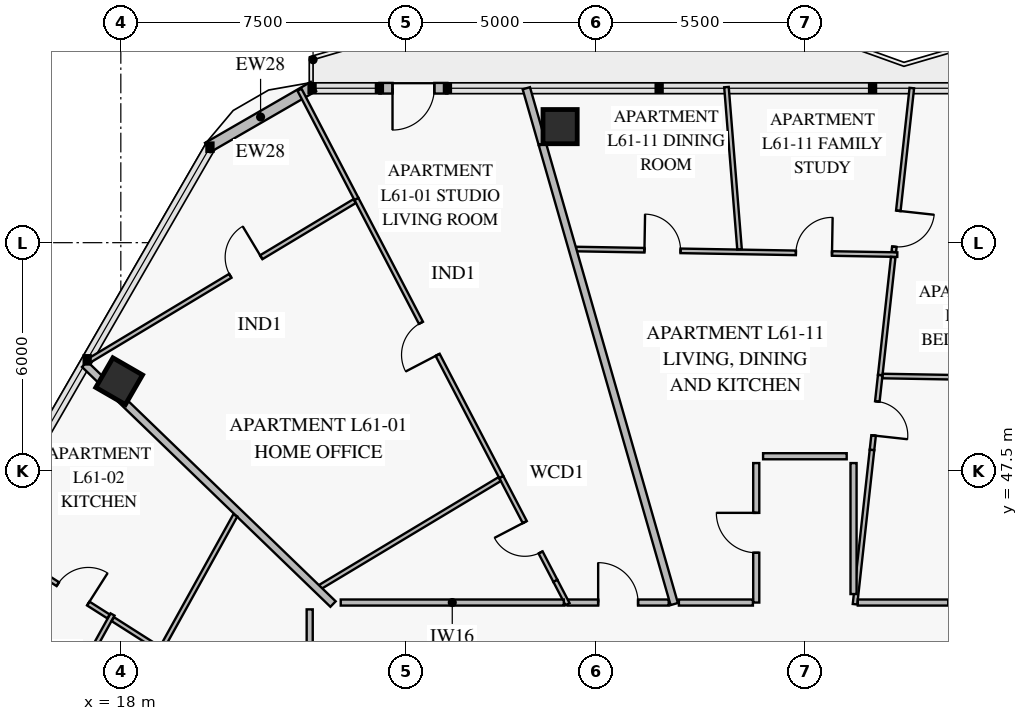
"""IFC4 building model, lengths in metres.
Left out: names, types, materials, properties, quantities, classifications, styles, units other than length and angle.
Written with IfcOpenShell. Run it as: python <this file> out.ifc"""

import sys

from ifc_helpers import new_model, si_unit, direction, frame, frame_2d, origin, origin_2d, place, context, subcontext, project, spatial, rectangle, extrude, element, fill, save


model = new_model("IFC4")
c1 = context("Model", 3, precision=1e-05, world=origin(), true_north=direction((0.0, 1.0)))
c2 = subcontext(c1, "Body", "Model", "MODEL_VIEW")
j1 = project(units=[si_unit("LENGTHUNIT", "METRE"), si_unit("PLANEANGLEUNIT", "RADIAN")], contexts=[c1])
p1 = place(None, origin())
s1 = spatial("IfcSite", under=j1, at=p1, CompositionType="ELEMENT")
p2 = place(p1, origin())
s2 = spatial("IfcBuilding", under=s1, at=p2, CompositionType="ELEMENT")
p3 = place(p2, frame((0.0, 0.0, 242.6)))
s3 = spatial("IfcBuildingStorey", under=s2, at=p3, CompositionType="ELEMENT", Elevation=242.6)
for number, where, z_axis, x_axis in (
    (1, (29.559, 56.554, 0.0), (0.0, 0.0, 1.0), (-1.0, 0.0, 0.0)),
    (2, (17.956, 49.855, 0.0), (0.0, 0.0, 1.0), (-0.5, -0.866, 0.0)),
):
    element("IfcColumn", number, at=place(p3, frame(where, z_axis=z_axis, x_axis=x_axis)), inside=s3, PredefinedType="COLUMN", context=c2, shape_type="SweptSolid", body=[
        extrude(rectangle(XDim=0.9, YDim=0.9, at=origin_2d()), origin(), (0.0, 0.0, 1.0), 3.55),
    ])
p4 = place(p3, frame((20.285, 56.004, 0.0), z_axis=(0.0, 0.0, 1.0), x_axis=(0.866028773314, 0.499994163758, 0.0)))
e3 = element("IfcWall", 3, at=p4, inside=s3, PredefinedType="SOLIDWALL", context=c2, shape_type="SweptSolid", body=[
    extrude(rectangle(XDim=3.215, YDim=0.28, at=frame_2d((1.607, 0.0))), origin(), (0.0, 0.0, 1.0), 3.55),
])
p5 = place(p3, frame((24.804, 57.564, 0.0), z_axis=(0.0, 0.0, 1.0), x_axis=(1.0, 0.0, 0.0)))
e4 = element("IfcWall", 4, at=p5, inside=s3, PredefinedType="SOLIDWALL", context=c2, shape_type="SweptSolid", body=[
    extrude(rectangle(XDim=1.79, YDim=0.28, at=frame_2d((0.895, 0.0))), origin(), (0.0, 0.0, 1.0), 3.55),
])
p6 = place(p5, frame((0.345, 0.0, 0.0)))
e5 = element("IfcOpeningElement", 5, at=p6, cuts=e4, PredefinedType="OPENING", context=c2, shape_type="SweptSolid", body=[
    extrude(rectangle(XDim=1.1, YDim=2.2, at=frame_2d((0.55, 1.1))), frame((0.0, 0.152, 0.0), z_axis=(0.0, -1.0, 0.0), x_axis=(1.0, 0.0, 0.0)), (0.0, 0.0, 1.0), 0.304),
])
p7 = place(p3, frame((29.435, 44.6, 0.0), z_axis=(0.0, 0.0, 1.0), x_axis=(-0.462075917285, 0.886840372708, 0.0)))
e6 = element("IfcWall", 6, at=p7, inside=s3, PredefinedType="PARTITIONING", context=c2, shape_type="SweptSolid", body=[
    extrude(rectangle(XDim=3.082, YDim=0.12, at=frame_2d((1.541, 0.0))), origin(), (0.0, 0.0, 1.0), 3.55),
])
p8 = place(p7, frame((0.844, 0.0, 0.0)))
e7 = element("IfcOpeningElement", 7, at=p8, cuts=e6, PredefinedType="OPENING", context=c2, shape_type="SweptSolid", body=[
    extrude(rectangle(XDim=0.9, YDim=2.1, at=frame_2d((0.45, 1.05))), frame((0.0, 0.072, 0.0), z_axis=(0.0, -1.0, 0.0), x_axis=(1.0, 0.0, 0.0)), (0.0, 0.0, 1.0), 0.144),
])
p9 = place(p3, frame((28.011, 47.333, 0.0), z_axis=(0.0, 0.0, 1.0), x_axis=(-0.46205322058, 0.886852198143, 0.0)))
e8 = element("IfcWall", 8, at=p9, inside=s3, PredefinedType="PARTITIONING", context=c2, shape_type="SweptSolid", body=[
    extrude(rectangle(XDim=8.251, YDim=0.12, at=frame_2d((4.125, 0.0))), origin(), (0.0, 0.0, 1.0), 2.93),
])
p10 = place(p9, frame((3.625, 0.0, 0.0)))
e9 = element("IfcOpeningElement", 9, at=p10, cuts=e8, PredefinedType="OPENING", context=c2, shape_type="SweptSolid", body=[
    extrude(rectangle(XDim=0.95, YDim=2.1, at=frame_2d((0.475, 1.05))), frame((0.0, 0.072, 0.0), z_axis=(0.0, -1.0, 0.0), x_axis=(1.0, 0.0, 0.0)), (0.0, 0.0, 1.0), 0.144),
])
p11 = place(p3, frame((24.152, 54.593, 0.0), z_axis=(0.0, 0.0, 1.0), x_axis=(-0.857165830908, -0.51504052105, 0.0)))
e10 = element("IfcWall", 10, at=p11, inside=s3, PredefinedType="PARTITIONING", context=c2, shape_type="SweptSolid", body=[
    extrude(rectangle(XDim=8.171, YDim=0.12, at=frame_2d((4.085, 0.0))), origin(), (0.0, 0.0, 1.0), 3.122),
])
p12 = place(p11, frame((2.866, 0.0, 0.0)))
e11 = element("IfcOpeningElement", 11, at=p12, cuts=e10, PredefinedType="OPENING", context=c2, shape_type="SweptSolid", body=[
    extrude(rectangle(XDim=0.95, YDim=2.1, at=frame_2d((0.475, 1.05))), frame((0.0, 0.072, 0.0), z_axis=(0.0, -1.0, 0.0), x_axis=(1.0, 0.0, 0.0)), (0.0, 0.0, 1.0), 0.144),
])
p13 = place(p3, frame((32.416, 44.03, 0.0), z_axis=(0.0, 0.0, 1.0), x_axis=(-1.0, 0.0, 0.0)))
e12 = element("IfcWall", 12, at=p13, inside=s3, PredefinedType="PARTITIONING", context=c2, shape_type="SweptSolid", body=[
    extrude(rectangle(XDim=2.661, YDim=0.16, at=frame_2d((1.331, 0.0))), origin(), (0.0, 0.0, 1.0), 3.55),
])
p14 = place(p13, frame((0.805, 0.0, 0.0)))
e13 = element("IfcOpeningElement", 13, at=p14, cuts=e12, PredefinedType="OPENING", context=c2, shape_type="SweptSolid", body=[
    extrude(rectangle(XDim=1.05, YDim=2.15, at=frame_2d((0.525, 1.075))), frame((0.0, 0.092, 0.0), z_axis=(0.0, -1.0, 0.0), x_axis=(1.0, 0.0, 0.0)), (0.0, 0.0, 1.0), 0.184),
])
p15 = place(p3, frame((17.781, 43.716, 0.0), z_axis=(0.0, 0.0, 1.0), x_axis=(-0.484799862098, -0.874625116098, 0.0)))
e14 = element("IfcWall", 14, at=p15, inside=s3, PredefinedType="PARTITIONING", context=c2, shape_type="SweptSolid", body=[
    extrude(rectangle(XDim=7.108, YDim=0.12, at=frame_2d((3.554, 0.0))), origin(), (0.0, 0.0, 1.0), 2.95),
])
p16 = place(p15, frame((3.079, 0.0, 0.0)))
e15 = element("IfcOpeningElement", 15, at=p16, cuts=e14, PredefinedType="OPENING", context=c2, shape_type="SweptSolid", body=[
    extrude(rectangle(XDim=0.95, YDim=2.1, at=frame_2d((0.475, 1.05))), frame((0.0, 0.072, 0.0), z_axis=(0.0, -1.0, 0.0), x_axis=(1.0, 0.0, 0.0)), (0.0, 0.0, 1.0), 0.144),
])
p17 = place(p3, frame((19.032, 42.802, 0.0), z_axis=(0.0, 0.0, 1.0), x_axis=(-0.843627335813, 0.536929155727, 0.0)))
e16 = element("IfcWall", 16, at=p17, inside=s3, PredefinedType="PARTITIONING", context=c2, shape_type="SweptSolid", body=[
    extrude(rectangle(XDim=1.472, YDim=0.12, at=frame_2d((0.736, 0.0))), origin(), (0.0, 0.0, 1.0), 3.55),
])
p18 = place(p3, frame((17.676, 43.665, 0.0), z_axis=(0.0, 0.0, 1.0), x_axis=(-0.843578359507, 0.537006099939, 0.0)))
e17 = element("IfcWall", 17, at=p18, inside=s3, PredefinedType="PARTITIONING", context=c2, shape_type="SweptSolid", body=[
    extrude(rectangle(XDim=3.87, YDim=0.12, at=frame_2d((1.935, 0.0))), origin(), (0.0, 0.0, 1.0), 2.93),
])
p19 = place(p18, frame((0.631, 0.0, 0.0)))
e18 = element("IfcOpeningElement", 18, at=p19, cuts=e17, PredefinedType="OPENING", context=c2, shape_type="SweptSolid", body=[
    extrude(rectangle(XDim=0.95, YDim=2.1, at=frame_2d((0.475, 1.05))), frame((0.0, 0.072, 0.0), z_axis=(0.0, -1.0, 0.0), x_axis=(1.0, 0.0, 0.0)), (0.0, 0.0, 1.0), 0.144),
])
p20 = place(p3, frame((38.432, 53.185, 0.0), z_axis=(0.0, 0.0, 1.0), x_axis=(-0.999847834671, 0.017444411801, 0.0)))
e19 = element("IfcWall", 19, at=p20, inside=s3, PredefinedType="PARTITIONING", context=c2, shape_type="SweptSolid", body=[
    extrude(rectangle(XDim=8.453, YDim=0.12, at=frame_2d((4.227, 0.0))), origin(), (0.0, 0.0, 1.0), 2.95),
])
p21 = place(p20, frame((1.719, 0.0, 0.0)))
e20 = element("IfcOpeningElement", 20, at=p21, cuts=e19, PredefinedType="OPENING", context=c2, shape_type="SweptSolid", body=[
    extrude(rectangle(XDim=0.95, YDim=2.1, at=frame_2d((0.475, 1.05))), frame((0.0, 0.072, 0.0), z_axis=(0.0, -1.0, 0.0), x_axis=(1.0, 0.0, 0.0)), (0.0, 0.0, 1.0), 0.144),
])
p22 = place(p20, frame((5.705, 0.0, 0.0)))
e21 = element("IfcOpeningElement", 21, at=p22, cuts=e19, PredefinedType="OPENING", context=c2, shape_type="SweptSolid", body=[
    extrude(rectangle(XDim=0.95, YDim=2.1, at=frame_2d((0.475, 1.05))), frame((0.0, 0.072, 0.0), z_axis=(0.0, -1.0, 0.0), x_axis=(1.0, 0.0, 0.0)), (0.0, 0.0, 1.0), 0.144),
])
p23 = place(p3, frame((37.766, 48.045, 0.0), z_axis=(0.0, 0.0, 1.0), x_axis=(0.109378163954, 0.994000209884, 0.0)))
e22 = element("IfcWall", 22, at=p23, inside=s3, PredefinedType="PARTITIONING", context=c2, shape_type="SweptSolid", body=[
    extrude(rectangle(XDim=1.984, YDim=0.12, at=frame_2d((0.992, 0.0))), origin(), (0.0, 0.0, 1.0), 3.15),
])
p24 = place(p23, frame((0.383, 0.0, 0.0)))
e23 = element("IfcOpeningElement", 23, at=p24, cuts=e22, PredefinedType="OPENING", context=c2, shape_type="SweptSolid", body=[
    extrude(rectangle(XDim=0.9, YDim=2.1, at=frame_2d((0.45, 1.05))), frame((0.0, 0.072, 0.0), z_axis=(0.0, -1.0, 0.0), x_axis=(1.0, 0.0, 0.0)), (0.0, 0.0, 1.0), 0.144),
])
p25 = place(p3, frame((37.983, 50.017, 0.0), z_axis=(0.0, 0.0, 1.0), x_axis=(0.109366759617, 0.994001464733, 0.0)))
e24 = element("IfcWall", 24, at=p25, inside=s3, PredefinedType="PARTITIONING", context=c2, shape_type="SweptSolid", body=[
    extrude(rectangle(XDim=3.121, YDim=0.12, at=frame_2d((1.561, 0.0))), origin(), (0.0, 0.0, 1.0), 3.55),
])
p26 = place(p3, frame((38.339, 53.255, 0.0), z_axis=(0.0, 0.0, 1.0), x_axis=(0.109363268669, 0.994001848824, 0.0)))
e25 = element("IfcWall", 25, at=p26, inside=s3, PredefinedType="PARTITIONING", context=c2, shape_type="SweptSolid", body=[
    extrude(rectangle(XDim=4.34, YDim=0.12, at=frame_2d((2.17, 0.0))), origin(), (0.0, 0.0, 1.0), 2.93),
])
p27 = place(p26, frame((0.14, 0.0, 0.0)))
e26 = element("IfcOpeningElement", 26, at=p27, cuts=e25, PredefinedType="OPENING", context=c2, shape_type="SweptSolid", body=[
    extrude(rectangle(XDim=0.95, YDim=2.1, at=frame_2d((0.475, 1.05))), frame((0.0, 0.072, 0.0), z_axis=(0.0, -1.0, 0.0), x_axis=(1.0, 0.0, 0.0)), (0.0, 0.0, 1.0), 0.144),
])
p28 = place(p3, frame((34.72, 47.7, 0.0), z_axis=(0.0, 0.0, 1.0), x_axis=(0.0, -1.0, 0.0)))
e27 = element("IfcWall", 27, at=p28, inside=s3, PredefinedType="PARTITIONING", context=c2, shape_type="SweptSolid", body=[
    extrude(rectangle(XDim=3.67, YDim=0.16, at=frame_2d((1.835, 0.0))), origin(), (0.0, 0.0, 1.0), 3.55),
])
p29 = place(p28, frame((1.31, 0.0, 0.0)))
e28 = element("IfcOpeningElement", 28, at=p29, cuts=e27, PredefinedType="OPENING", context=c2, shape_type="SweptSolid", body=[
    extrude(rectangle(XDim=1.05, YDim=2.15, at=frame_2d((0.525, 1.075))), frame((0.0, 0.092, 0.0), z_axis=(0.0, -1.0, 0.0), x_axis=(1.0, 0.0, 0.0)), (0.0, 0.0, 1.0), 0.184),
])
p30 = place(p3, frame((32.562, 43.99, 0.0), z_axis=(0.0, 0.0, 1.0), x_axis=(-0.275638433315, 0.96126138697, 0.0)))
e29 = element("IfcWall", 29, at=p30, inside=s3, PredefinedType="PARTITIONING", context=c2, shape_type="SweptSolid", body=[
    extrude(rectangle(XDim=12.583, YDim=0.2, at=frame_2d((6.292, 0.0))), origin(), (0.0, 0.0, 1.0), 3.55),
])
p31 = place(p3, frame((29.089, 56.101, 0.0), z_axis=(0.0, 0.0, 1.0), x_axis=(-0.27554766027, 0.961287411194, 0.0)))
e30 = element("IfcWall", 30, at=p31, inside=s3, PredefinedType="PARTITIONING", context=c2, shape_type="SweptSolid", body=[
    extrude(rectangle(XDim=1.521, YDim=0.2, at=frame_2d((0.761, 0.0))), origin(), (0.0, 0.0, 1.0), 2.93),
])
p32 = place(p3, frame((29.754, 43.988, 0.0), z_axis=(0.0, 0.0, 1.0), x_axis=(-0.461864870983, 0.886950303541, 0.0)))
e31 = element("IfcWall", 31, at=p32, inside=s3, PredefinedType="PARTITIONING", context=c2, shape_type="SweptSolid", body=[
    extrude(rectangle(XDim=0.69, YDim=0.12, at=frame_2d((0.345, 0.0))), origin(), (0.0, 0.0, 1.0), 3.55),
])
p33 = place(p3, frame((24.199, 54.65, 0.0), z_axis=(0.0, 0.0, 1.0), x_axis=(-0.462045585495, 0.886856176009, 0.0)))
e32 = element("IfcWall", 32, at=p33, inside=s3, PredefinedType="PARTITIONING", context=c2, shape_type="SweptSolid", body=[
    extrude(rectangle(XDim=3.239, YDim=0.12, at=frame_2d((1.62, 0.0))), origin(), (0.0, 0.0, 1.0), 3.55),
])
p34 = place(p3, frame((27.964, 47.276, 0.0), z_axis=(0.0, 0.0, 1.0), x_axis=(-0.857162223485, -0.515046524724, 0.0)))
e33 = element("IfcWall", 33, at=p34, inside=s3, PredefinedType="PARTITIONING", context=c2, shape_type="SweptSolid", body=[
    extrude(rectangle(XDim=5.54, YDim=0.12, at=frame_2d((2.77, 0.0))), origin(), (0.0, 0.0, 1.0), 2.95),
])
p35 = place(p3, frame((23.584, 43.99, 0.0), z_axis=(0.0, 0.0, 1.0), x_axis=(-0.719338080926, 0.694660150958, 0.0)))
e34 = element("IfcWall", 34, at=p35, inside=s3, PredefinedType="PARTITIONING", context=c2, shape_type="SweptSolid", body=[
    extrude(rectangle(XDim=7.766, YDim=0.2, at=frame_2d((3.883, 0.0))), origin(), (0.0, 0.0, 1.0), 2.95),
])
p36 = place(p3, frame((17.486, 49.878, 0.0), z_axis=(0.0, 0.0, 1.0), x_axis=(-0.719422178176, 0.694573055587, 0.0)))
e35 = element("IfcWall", 35, at=p36, inside=s3, PredefinedType="PARTITIONING", context=c2, shape_type="SweptSolid", body=[
    extrude(rectangle(XDim=0.609, YDim=0.2, at=frame_2d((0.305, 0.0))), origin(), (0.0, 0.0, 1.0), 3.55),
])
p37 = place(p3, frame((21.013, 46.323, 0.0), z_axis=(0.0, 0.0, 1.0), x_axis=(-0.484828920672, -0.874609008461, 0.0)))
e36 = element("IfcWall", 36, at=p37, inside=s3, PredefinedType="PARTITIONING", context=c2, shape_type="SweptSolid", body=[
    extrude(rectangle(XDim=3.974, YDim=0.12, at=frame_2d((1.987, 0.0))), origin(), (0.0, 0.0, 1.0), 3.55),
])
p38 = place(p3, frame((34.281, 53.326, 0.0), z_axis=(0.0, 0.0, 1.0), x_axis=(-0.080397895883, 0.996762849597, 0.0)))
e37 = element("IfcWall", 37, at=p38, inside=s3, PredefinedType="PARTITIONING", context=c2, shape_type="SweptSolid", body=[
    extrude(rectangle(XDim=4.282, YDim=0.12, at=frame_2d((2.141, 0.0))), origin(), (0.0, 0.0, 1.0), 2.93),
])
p39 = place(p3, frame((37.319, 43.985, 0.0), z_axis=(0.0, 0.0, 1.0), x_axis=(0.109394817792, 0.993998377182, 0.0)))
e38 = element("IfcWall", 38, at=p39, inside=s3, PredefinedType="PARTITIONING", context=c2, shape_type="SweptSolid", body=[
    extrude(rectangle(XDim=4.084, YDim=0.12, at=frame_2d((2.042, 0.0))), origin(), (0.0, 0.0, 1.0), 3.55),
])
p40 = place(p3, frame((41.711, 49.927, 0.0), z_axis=(0.0, 0.0, 1.0), x_axis=(-0.999847573959, 0.017459348466, 0.0)))
e39 = element("IfcWall", 39, at=p40, inside=s3, PredefinedType="PARTITIONING", context=c2, shape_type="SweptSolid", body=[
    extrude(rectangle(XDim=3.664, YDim=0.12, at=frame_2d((1.832, 0.0))), origin(), (0.0, 0.0, 1.0), 2.95),
])
p41 = place(p3, frame((29.656, 44.03, 0.0), z_axis=(0.0, 0.0, 1.0), x_axis=(-1.0, 0.0, 0.0)))
e40 = element("IfcWall", 40, at=p41, inside=s3, PredefinedType="PARTITIONING", context=c2, shape_type="SweptSolid", body=[
    extrude(rectangle(XDim=5.869, YDim=0.16, at=frame_2d((2.935, 0.0))), origin(), (0.0, 0.0, 1.0), 2.95),
])
p42 = place(p3, frame((22.97, 43.85, 0.0), z_axis=(0.0, 0.0, 1.0), x_axis=(0.0, -1.0, 0.0)))
e41 = element("IfcWall", 41, at=p42, inside=s3, PredefinedType="PARTITIONING", context=c2, shape_type="SweptSolid", body=[
    extrude(rectangle(XDim=3.475, YDim=0.16, at=frame_2d((1.737, 0.0))), origin(), (0.0, 0.0, 1.0), 3.55),
])
p43 = place(p3, frame((37.28, 44.253, 0.0), z_axis=(0.0, 0.0, 1.0), x_axis=(0.0, 1.0, 0.0)))
e42 = element("IfcWall", 42, at=p43, inside=s3, PredefinedType="PARTITIONING", context=c2, shape_type="SweptSolid", body=[
    extrude(rectangle(XDim=3.447, YDim=0.16, at=frame_2d((1.723, 0.0))), origin(), (0.0, 0.0, 1.0), 3.55),
])
p44 = place(p3, frame((37.1, 47.88, 0.0), z_axis=(0.0, 0.0, 1.0), x_axis=(-1.0, 0.0, 0.0)))
e43 = element("IfcWall", 43, at=p44, inside=s3, PredefinedType="PARTITIONING", context=c2, shape_type="SweptSolid", body=[
    extrude(rectangle(XDim=2.2, YDim=0.16, at=frame_2d((1.1, 0.0))), origin(), (0.0, 0.0, 1.0), 3.55),
])
p45 = place(p3, frame((34.632, 44.03, 0.0), z_axis=(0.0, 0.0, 1.0), x_axis=(-1.0, 0.0, 0.0)))
e44 = element("IfcWall", 44, at=p45, inside=s3, PredefinedType="PARTITIONING", context=c2, shape_type="SweptSolid", body=[
    extrude(rectangle(XDim=1.948, YDim=0.16, at=frame_2d((0.974, 0.0))), origin(), (0.0, 0.0, 1.0), 2.95),
])
p46 = place(p3, frame((39.772, 44.03, 0.0), z_axis=(0.0, 0.0, 1.0), x_axis=(-1.0, 0.0, 0.0)))
e45 = element("IfcWall", 45, at=p46, inside=s3, PredefinedType="PARTITIONING", context=c2, shape_type="SweptSolid", body=[
    extrude(rectangle(XDim=2.38, YDim=0.16, at=frame_2d((1.19, 0.0))), origin(), (0.0, 0.0, 1.0), 2.95),
])
p47 = place(p6, frame((1.1, 0.0, 0.0), z_axis=(0.0, 0.0, 1.0), x_axis=(-1.0, 0.0, 0.0)))
e46 = element("IfcDoor", 46, at=p47, inside=s3, OperationType="SINGLE_SWING_RIGHT", PredefinedType="DOOR", context=c2, shape_type="SweptSolid", body=[
    extrude(rectangle(XDim=1.1, YDim=2.2, at=frame_2d((0.55, 1.1))), frame((0.0, 0.025, 0.0), z_axis=(0.0, -1.0, 0.0), x_axis=(1.0, 0.0, 0.0)), (0.0, 0.0, 1.0), 0.05),
])
fill(e5, e46)
p48 = place(p8, origin())
e47 = element("IfcDoor", 47, at=p48, inside=s3, OperationType="SINGLE_SWING_RIGHT", PredefinedType="DOOR", context=c2, shape_type="SweptSolid", body=[
    extrude(rectangle(XDim=0.9, YDim=2.1, at=frame_2d((0.45, 1.05))), frame((0.0, 0.025, 0.0), z_axis=(0.0, -1.0, 0.0), x_axis=(1.0, 0.0, 0.0)), (0.0, 0.0, 1.0), 0.05),
])
fill(e7, e47)
p49 = place(p10, origin())
e48 = element("IfcDoor", 48, at=p49, inside=s3, OperationType="SINGLE_SWING_LEFT", PredefinedType="DOOR", context=c2, shape_type="SweptSolid", body=[
    extrude(rectangle(XDim=0.95, YDim=2.1, at=frame_2d((0.475, 1.05))), frame((0.0, 0.025, 0.0), z_axis=(0.0, -1.0, 0.0), x_axis=(1.0, 0.0, 0.0)), (0.0, 0.0, 1.0), 0.05),
])
fill(e9, e48)
p50 = place(p12, frame((0.95, 0.0, 0.0), z_axis=(0.0, 0.0, 1.0), x_axis=(-1.0, 0.0, 0.0)))
e49 = element("IfcDoor", 49, at=p50, inside=s3, OperationType="SINGLE_SWING_RIGHT", PredefinedType="DOOR", context=c2, shape_type="SweptSolid", body=[
    extrude(rectangle(XDim=0.95, YDim=2.1, at=frame_2d((0.475, 1.05))), frame((0.0, 0.025, 0.0), z_axis=(0.0, -1.0, 0.0), x_axis=(1.0, 0.0, 0.0)), (0.0, 0.0, 1.0), 0.05),
])
fill(e11, e49)
p51 = place(p14, frame((1.05, 0.0, 0.0), z_axis=(0.0, 0.0, 1.0), x_axis=(-1.0, 0.0, 0.0)))
e50 = element("IfcDoor", 50, at=p51, inside=s3, OperationType="SINGLE_SWING_LEFT", PredefinedType="DOOR", context=c2, shape_type="SweptSolid", body=[
    extrude(rectangle(XDim=1.05, YDim=2.15, at=frame_2d((0.525, 1.075))), frame((0.0, 0.025, 0.0), z_axis=(0.0, -1.0, 0.0), x_axis=(1.0, 0.0, 0.0)), (0.0, 0.0, 1.0), 0.05),
])
fill(e13, e50)
p52 = place(p19, frame((0.95, 0.0, 0.0), z_axis=(0.0, 0.0, 1.0), x_axis=(-1.0, 0.0, 0.0)))
e51 = element("IfcDoor", 51, at=p52, inside=s3, OperationType="SINGLE_SWING_RIGHT", PredefinedType="DOOR", context=c2, shape_type="SweptSolid", body=[
    extrude(rectangle(XDim=0.95, YDim=2.1, at=frame_2d((0.475, 1.05))), frame((0.0, 0.025, 0.0), z_axis=(0.0, -1.0, 0.0), x_axis=(1.0, 0.0, 0.0)), (0.0, 0.0, 1.0), 0.05),
])
fill(e18, e51)
p53 = place(p21, frame((0.95, 0.0, 0.0), z_axis=(0.0, 0.0, 1.0), x_axis=(-1.0, 0.0, 0.0)))
e52 = element("IfcDoor", 52, at=p53, inside=s3, OperationType="SINGLE_SWING_RIGHT", PredefinedType="DOOR", context=c2, shape_type="SweptSolid", body=[
    extrude(rectangle(XDim=0.95, YDim=2.1, at=frame_2d((0.475, 1.05))), frame((0.0, 0.025, 0.0), z_axis=(0.0, -1.0, 0.0), x_axis=(1.0, 0.0, 0.0)), (0.0, 0.0, 1.0), 0.05),
])
fill(e20, e52)
p54 = place(p22, frame((0.95, 0.0, 0.0), z_axis=(0.0, 0.0, 1.0), x_axis=(-1.0, 0.0, 0.0)))
e53 = element("IfcDoor", 53, at=p54, inside=s3, OperationType="SINGLE_SWING_LEFT", PredefinedType="DOOR", context=c2, shape_type="SweptSolid", body=[
    extrude(rectangle(XDim=0.95, YDim=2.1, at=frame_2d((0.475, 1.05))), frame((0.0, 0.025, 0.0), z_axis=(0.0, -1.0, 0.0), x_axis=(1.0, 0.0, 0.0)), (0.0, 0.0, 1.0), 0.05),
])
fill(e21, e53)
p55 = place(p24, frame((0.9, 0.0, 0.0), z_axis=(0.0, 0.0, 1.0), x_axis=(-1.0, 0.0, 0.0)))
e54 = element("IfcDoor", 54, at=p55, inside=s3, OperationType="SINGLE_SWING_RIGHT", PredefinedType="DOOR", context=c2, shape_type="SweptSolid", body=[
    extrude(rectangle(XDim=0.9, YDim=2.1, at=frame_2d((0.45, 1.05))), frame((0.0, 0.025, 0.0), z_axis=(0.0, -1.0, 0.0), x_axis=(1.0, 0.0, 0.0)), (0.0, 0.0, 1.0), 0.05),
])
fill(e23, e54)
p56 = place(p27, frame((0.95, 0.0, 0.0), z_axis=(0.0, 0.0, 1.0), x_axis=(-1.0, 0.0, 0.0)))
e55 = element("IfcDoor", 55, at=p56, inside=s3, OperationType="SINGLE_SWING_LEFT", PredefinedType="DOOR", context=c2, shape_type="SweptSolid", body=[
    extrude(rectangle(XDim=0.95, YDim=2.1, at=frame_2d((0.475, 1.05))), frame((0.0, 0.025, 0.0), z_axis=(0.0, -1.0, 0.0), x_axis=(1.0, 0.0, 0.0)), (0.0, 0.0, 1.0), 0.05),
])
fill(e26, e55)
p57 = place(p29, frame((1.05, 0.0, 0.0), z_axis=(0.0, 0.0, 1.0), x_axis=(-1.0, 0.0, 0.0)))
e56 = element("IfcDoor", 56, at=p57, inside=s3, OperationType="SINGLE_SWING_RIGHT", PredefinedType="DOOR", context=c2, shape_type="SweptSolid", body=[
    extrude(rectangle(XDim=1.05, YDim=2.15, at=frame_2d((0.525, 1.075))), frame((0.0, 0.025, 0.0), z_axis=(0.0, -1.0, 0.0), x_axis=(1.0, 0.0, 0.0)), (0.0, 0.0, 1.0), 0.05),
])
fill(e28, e56)
save(model, sys.argv[1])
